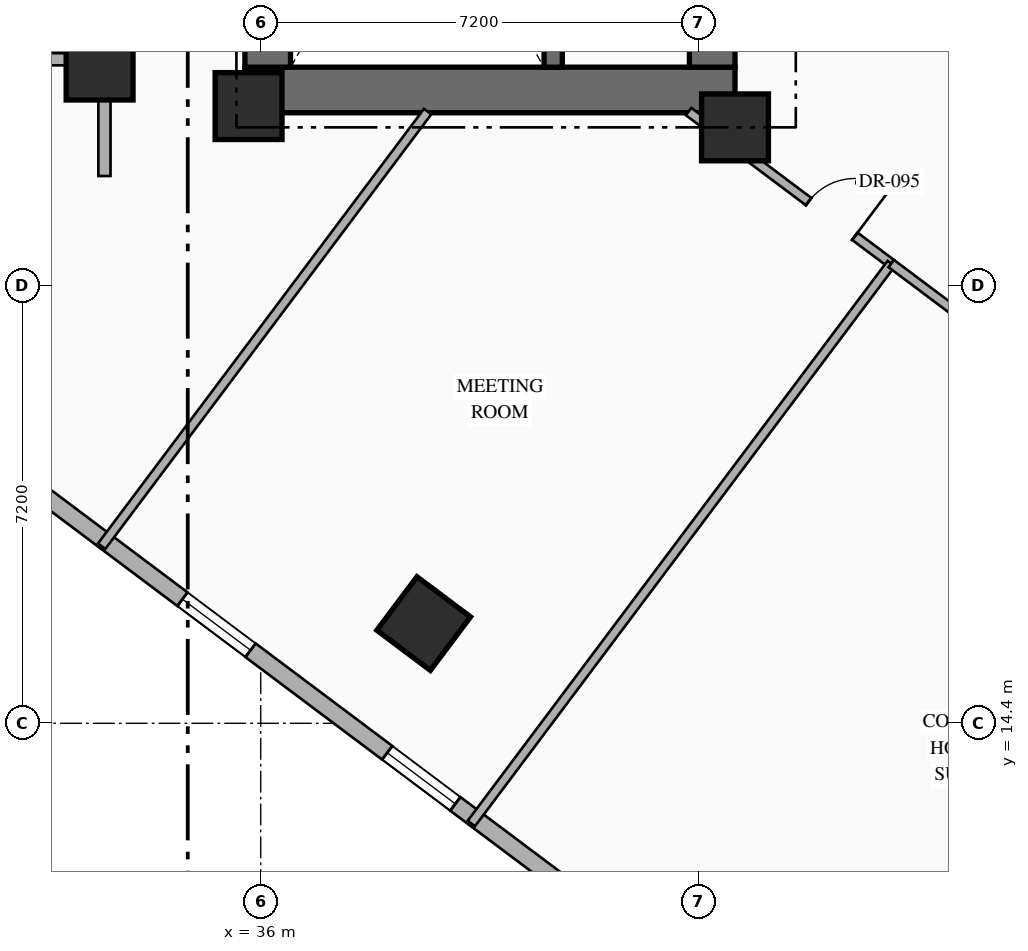
"""IFC4 building model, lengths in metres.
Left out: names, types, materials, properties, quantities, classifications, styles, units other than length and angle.
Written with IfcOpenShell. Run it as: python <this file> out.ifc"""

import sys

from ifc_helpers import new_model, si_unit, direction, frame, frame_2d, origin, origin_2d, place, context, subcontext, project, spatial, rectangle, hollow_rectangle, extrude, element, fill, save


model = new_model("IFC4")
c1 = context("Model", 3, precision=1e-05, world=origin(), true_north=direction((0.0, 1.0)))
c2 = subcontext(c1, "Body", "Model", "MODEL_VIEW")
j1 = project(units=[si_unit("LENGTHUNIT", "METRE"), si_unit("PLANEANGLEUNIT", "RADIAN")], contexts=[c1])
p1 = place(None, origin())
s1 = spatial("IfcSite", under=j1, at=p1, CompositionType="ELEMENT")
p2 = place(p1, origin())
s2 = spatial("IfcBuilding", under=s1, at=p2, CompositionType="ELEMENT")
p3 = place(p2, frame((0.0, 0.0, 46.65)))
s3 = spatial("IfcBuildingStorey", under=s2, at=p3, CompositionType="ELEMENT", Elevation=46.65)
p4 = place(p3, frame((35.74, 24.815, 0.0), z_axis=(0.0, 0.0, 1.0), x_axis=(1.0, 0.0, 0.0)))
e1 = element("IfcWall", 1, at=p4, inside=s3, PredefinedType="SHEAR", context=c2, shape_type="SweptSolid", body=[
    extrude(rectangle(XDim=8.06, YDim=0.75, at=frame_2d((4.03, 0.0))), origin(), (0.0, 0.0, 1.0), 3.35),
])
p5 = place(p3, frame((36.115, 25.19, 0.0), z_axis=(0.0, 0.0, 1.0), x_axis=(0.0, 1.0, 0.0)))
e2 = element("IfcWall", 2, at=p5, inside=s3, PredefinedType="SHEAR", context=c2, shape_type="SweptSolid", body=[
    extrude(rectangle(XDim=9.48, YDim=0.75, at=frame_2d((4.74, 0.0))), origin(), (0.0, 0.0, 1.0), 3.35),
])
p6 = place(p3, frame((43.425, 25.19, 0.0), z_axis=(0.0, 0.0, 1.0), x_axis=(0.0, 1.0, 0.0)))
e3 = element("IfcWall", 3, at=p6, inside=s3, PredefinedType="SHEAR", context=c2, shape_type="SweptSolid", body=[
    extrude(rectangle(XDim=9.48, YDim=0.75, at=frame_2d((4.74, 0.0))), origin(), (0.0, 0.0, 1.0), 3.35),
])
p7 = place(p6, frame((1.21, 0.0, 0.0)))
e4 = element("IfcOpeningElement", 4, at=p7, cuts=e3, PredefinedType="OPENING", context=c2, shape_type="SweptSolid", body=[
    extrude(rectangle(XDim=0.85, YDim=2.08, at=frame_2d((0.425, 1.04))), frame((0.0, 0.385, 0.0), z_axis=(0.0, -1.0, 0.0), x_axis=(1.0, 0.0, 0.0)), (0.0, 0.0, 1.0), 0.77),
])
p8 = place(p6, frame((4.46, 0.0, 0.0)))
e5 = element("IfcOpeningElement", 5, at=p8, cuts=e3, PredefinedType="OPENING", context=c2, shape_type="SweptSolid", body=[
    extrude(rectangle(XDim=0.85, YDim=2.08, at=frame_2d((0.425, 1.04))), frame((0.0, 0.385, 0.0), z_axis=(0.0, -1.0, 0.0), x_axis=(1.0, 0.0, 0.0)), (0.0, 0.0, 1.0), 0.77),
])
p9 = place(p3, frame((40.81, 25.19, 0.0), z_axis=(0.0, 0.0, 1.0), x_axis=(0.0, 1.0, 0.0)))
e6 = element("IfcWall", 6, at=p9, inside=s3, PredefinedType="SHEAR", context=c2, shape_type="SweptSolid", body=[
    extrude(rectangle(XDim=9.48, YDim=0.3, at=frame_2d((4.74, 0.0))), origin(), (0.0, 0.0, 1.0), 3.35),
])
for number, where, z_axis, x_axis in (
    (7, (35.8, 24.55, 0.0), (0.0, 0.0, 1.0), (1.0, 0.0, 0.0)),
    (8, (43.8, 24.2, 0.0), (0.0, 0.0, 1.0), (1.0, 0.0, 0.0)),
):
    element("IfcColumn", number, at=place(p3, frame(where, z_axis=z_axis, x_axis=x_axis)), inside=s3, PredefinedType="COLUMN", context=c2, shape_type="SweptSolid", body=[
        extrude(rectangle(XDim=1.1, YDim=1.1, at=origin_2d()), origin(), (0.0, 0.0, 1.0), 3.35),
    ])
for number, where, z_axis, x_axis in (
    (9, (33.35, 25.2, 0.0), (0.0, 0.0, 1.0), (1.0, 0.0, 0.0)),
    (10, (38.68, 16.04, 0.0), (0.0, 0.0, 1.0), (0.8, -0.6, 0.0)),
):
    element("IfcColumn", number, at=place(p3, frame(where, z_axis=z_axis, x_axis=x_axis)), inside=s3, PredefinedType="COLUMN", context=c2, shape_type="SweptSolid", body=[
        extrude(hollow_rectangle(XDim=1.1, YDim=1.1, WallThickness=0.04, at=origin_2d()), origin(), (0.0, 0.0, 1.0), 3.35),
    ])
p10 = place(p3, frame((44.86, 40.73, 0.0), z_axis=(0.0, 0.0, 1.0), x_axis=(0.800006902154, -0.599990797017, 0.0)))
e11 = element("IfcWall", 11, at=p10, inside=s3, PredefinedType="STANDARD", context=c2, shape_type="SweptSolid", body=[
    extrude(rectangle(XDim=29.712, YDim=0.28, at=frame_2d((14.856, 0.0))), origin(), (0.0, 0.0, 1.0), 3.13),
])
p11 = place(p10, frame((14.249, 0.0, 0.0)))
e12 = element("IfcOpeningElement", 12, at=p11, cuts=e11, PredefinedType="OPENING", context=c2, shape_type="SweptSolid", body=[
    extrude(rectangle(XDim=1.1, YDim=2.2, at=frame_2d((0.55, 1.1))), frame((0.0, 0.15, 0.0), z_axis=(0.0, -1.0, 0.0), x_axis=(1.0, 0.0, 0.0)), (0.0, 0.0, 1.0), 0.3),
])
p12 = place(p10, frame((1.612, 0.0, 0.85)))
e13 = element("IfcOpeningElement", 13, at=p12, cuts=e11, PredefinedType="OPENING", context=c2, shape_type="SweptSolid", body=[
    extrude(rectangle(XDim=1.4, YDim=1.8, at=frame_2d((0.7, 0.9))), frame((0.0, 0.15, 0.0), z_axis=(0.0, -1.0, 0.0), x_axis=(1.0, 0.0, 0.0)), (0.0, 0.0, 1.0), 0.3),
])
p13 = place(p10, frame((5.667, 0.0, 0.85)))
e14 = element("IfcOpeningElement", 14, at=p13, cuts=e11, PredefinedType="OPENING", context=c2, shape_type="SweptSolid", body=[
    extrude(rectangle(XDim=1.4, YDim=1.8, at=frame_2d((0.7, 0.9))), frame((0.0, 0.15, 0.0), z_axis=(0.0, -1.0, 0.0), x_axis=(1.0, 0.0, 0.0)), (0.0, 0.0, 1.0), 0.3),
])
p14 = place(p10, frame((9.912, 0.0, 0.85)))
e15 = element("IfcOpeningElement", 15, at=p14, cuts=e11, PredefinedType="OPENING", context=c2, shape_type="SweptSolid", body=[
    extrude(rectangle(XDim=1.4, YDim=1.8, at=frame_2d((0.7, 0.9))), frame((0.0, 0.15, 0.0), z_axis=(0.0, -1.0, 0.0), x_axis=(1.0, 0.0, 0.0)), (0.0, 0.0, 1.0), 0.3),
])
p15 = place(p10, frame((18.803, 0.0, 0.85)))
e16 = element("IfcOpeningElement", 16, at=p15, cuts=e11, PredefinedType="OPENING", context=c2, shape_type="SweptSolid", body=[
    extrude(rectangle(XDim=1.4, YDim=1.8, at=frame_2d((0.7, 0.9))), frame((0.0, 0.15, 0.0), z_axis=(0.0, -1.0, 0.0), x_axis=(1.0, 0.0, 0.0)), (0.0, 0.0, 1.0), 0.3),
])
p16 = place(p10, frame((22.645, 0.0, 0.85)))
e17 = element("IfcOpeningElement", 17, at=p16, cuts=e11, PredefinedType="OPENING", context=c2, shape_type="SweptSolid", body=[
    extrude(rectangle(XDim=1.4, YDim=1.8, at=frame_2d((0.7, 0.9))), frame((0.0, 0.15, 0.0), z_axis=(0.0, -1.0, 0.0), x_axis=(1.0, 0.0, 0.0)), (0.0, 0.0, 1.0), 0.3),
])
p17 = place(p10, frame((27.668, 0.0, 0.85)))
e18 = element("IfcOpeningElement", 18, at=p17, cuts=e11, PredefinedType="OPENING", context=c2, shape_type="SweptSolid", body=[
    extrude(rectangle(XDim=1.4, YDim=1.8, at=frame_2d((0.7, 0.9))), frame((0.0, 0.15, 0.0), z_axis=(0.0, -1.0, 0.0), x_axis=(1.0, 0.0, 0.0)), (0.0, 0.0, 1.0), 0.3),
])
p18 = place(p3, frame((53.318, 2.487, 0.0), z_axis=(0.0, 0.0, 1.0), x_axis=(-0.800004174678, 0.599994433723, 0.0)))
e19 = element("IfcWall", 19, at=p18, inside=s3, PredefinedType="STANDARD", context=c2, shape_type="SweptSolid", body=[
    extrude(rectangle(XDim=35.089, YDim=0.28, at=frame_2d((17.544, 0.0))), origin(), (0.0, 0.0, 1.0), 3.13),
])
p19 = place(p18, frame((1.931, 0.0, 0.85)))
e20 = element("IfcOpeningElement", 20, at=p19, cuts=e19, PredefinedType="OPENING", context=c2, shape_type="SweptSolid", body=[
    extrude(rectangle(XDim=1.4, YDim=1.8, at=frame_2d((0.7, 0.9))), frame((0.0, 0.15, 0.0), z_axis=(0.0, -1.0, 0.0), x_axis=(1.0, 0.0, 0.0)), (0.0, 0.0, 1.0), 0.3),
])
p20 = place(p18, frame((6.819, 0.0, 0.85)))
e21 = element("IfcOpeningElement", 21, at=p20, cuts=e19, PredefinedType="OPENING", context=c2, shape_type="SweptSolid", body=[
    extrude(rectangle(XDim=1.4, YDim=1.8, at=frame_2d((0.7, 0.9))), frame((0.0, 0.15, 0.0), z_axis=(0.0, -1.0, 0.0), x_axis=(1.0, 0.0, 0.0)), (0.0, 0.0, 1.0), 0.3),
])
p21 = place(p18, frame((11.832, 0.0, 0.85)))
e22 = element("IfcOpeningElement", 22, at=p21, cuts=e19, PredefinedType="OPENING", context=c2, shape_type="SweptSolid", body=[
    extrude(rectangle(XDim=1.4, YDim=1.8, at=frame_2d((0.7, 0.9))), frame((0.0, 0.15, 0.0), z_axis=(0.0, -1.0, 0.0), x_axis=(1.0, 0.0, 0.0)), (0.0, 0.0, 1.0), 0.3),
])
p22 = place(p18, frame((17.647, 0.0, 0.85)))
e23 = element("IfcOpeningElement", 23, at=p22, cuts=e19, PredefinedType="OPENING", context=c2, shape_type="SweptSolid", body=[
    extrude(rectangle(XDim=1.4, YDim=1.8, at=frame_2d((0.7, 0.9))), frame((0.0, 0.15, 0.0), z_axis=(0.0, -1.0, 0.0), x_axis=(1.0, 0.0, 0.0)), (0.0, 0.0, 1.0), 0.3),
])
p23 = place(p18, frame((21.857, 0.0, 0.85)))
e24 = element("IfcOpeningElement", 24, at=p23, cuts=e19, PredefinedType="OPENING", context=c2, shape_type="SweptSolid", body=[
    extrude(rectangle(XDim=1.4, YDim=1.8, at=frame_2d((0.7, 0.9))), frame((0.0, 0.15, 0.0), z_axis=(0.0, -1.0, 0.0), x_axis=(1.0, 0.0, 0.0)), (0.0, 0.0, 1.0), 0.3),
])
p24 = place(p18, frame((26.87, 0.0, 0.85)))
e25 = element("IfcOpeningElement", 25, at=p24, cuts=e19, PredefinedType="OPENING", context=c2, shape_type="SweptSolid", body=[
    extrude(rectangle(XDim=1.4, YDim=1.8, at=frame_2d((0.7, 0.9))), frame((0.0, 0.15, 0.0), z_axis=(0.0, -1.0, 0.0), x_axis=(1.0, 0.0, 0.0)), (0.0, 0.0, 1.0), 0.3),
])
p25 = place(p18, frame((31.757, 0.0, 0.85)))
e26 = element("IfcOpeningElement", 26, at=p25, cuts=e19, PredefinedType="OPENING", context=c2, shape_type="SweptSolid", body=[
    extrude(rectangle(XDim=1.4, YDim=1.8, at=frame_2d((0.7, 0.9))), frame((0.0, 0.15, 0.0), z_axis=(0.0, -1.0, 0.0), x_axis=(1.0, 0.0, 0.0)), (0.0, 0.0, 1.0), 0.3),
])
p26 = place(p3, frame((33.43, 23.4, 0.0), z_axis=(0.0, 0.0, 1.0), x_axis=(0.0, 1.0, 0.0)))
e27 = element("IfcWall", 27, at=p26, inside=s3, PredefinedType="STANDARD", context=c2, shape_type="SweptSolid", body=[
    extrude(rectangle(XDim=4.08, YDim=0.2, at=frame_2d((2.04, 0.0))), origin(), (0.0, 0.0, 1.0), 2.425),
])
p27 = place(p3, frame((25.55, 25.32, 0.0), z_axis=(0.0, 0.0, 1.0), x_axis=(1.0, 0.0, 0.0)))
e28 = element("IfcWall", 28, at=p27, inside=s3, PredefinedType="STANDARD", context=c2, shape_type="SweptSolid", body=[
    extrude(rectangle(XDim=7.88, YDim=0.2, at=frame_2d((3.94, 0.0))), origin(), (0.0, 0.0, 1.0), 2.525),
])
p28 = place(p3, frame((43.037, 24.46, 0.0), z_axis=(0.0, 0.0, 1.0), x_axis=(0.799971872363, -0.600037501685, 0.0)))
e29 = element("IfcWall", 29, at=p28, inside=s3, PredefinedType="PARTITIONING", context=c2, shape_type="SweptSolid", body=[
    extrude(rectangle(XDim=4.167, YDim=0.15, at=frame_2d((2.083, 0.0))), origin(), (0.0, 0.0, 1.0), 2.425),
])
p29 = place(p28, frame((2.468, 0.0, 0.0)))
e30 = element("IfcOpeningElement", 30, at=p29, cuts=e29, PredefinedType="OPENING", context=c2, shape_type="SweptSolid", body=[
    extrude(rectangle(XDim=0.95, YDim=2.15, at=frame_2d((0.475, 1.075))), frame((0.0, 0.085, 0.0), z_axis=(0.0, -1.0, 0.0), x_axis=(1.0, 0.0, 0.0)), (0.0, 0.0, 1.0), 0.17),
])
p30 = place(p3, frame((33.384, 17.312, 0.0), z_axis=(0.0, 0.0, 1.0), x_axis=(0.600008743659, 0.799993442181, 0.0)))
e31 = element("IfcWall", 31, at=p30, inside=s3, PredefinedType="PARTITIONING", context=c2, shape_type="SweptSolid", body=[
    extrude(rectangle(XDim=8.935, YDim=0.15, at=frame_2d((4.468, 0.0))), origin(), (0.0, 0.0, 1.0), 3.13),
])
p31 = place(p3, frame((39.464, 12.752, 0.0), z_axis=(0.0, 0.0, 1.0), x_axis=(0.6, 0.8, 0.0)))
e32 = element("IfcWall", 32, at=p31, inside=s3, PredefinedType="PARTITIONING", context=c2, shape_type="SweptSolid", body=[
    extrude(rectangle(XDim=11.51, YDim=0.15, at=frame_2d((5.755, 0.0))), origin(), (0.0, 0.0, 1.0), 3.13),
])
p32 = place(p3, frame((46.37, 21.96, 0.0), z_axis=(0.0, 0.0, 1.0), x_axis=(0.799997249048, -0.600003667918, 0.0)))
e33 = element("IfcWall", 33, at=p32, inside=s3, PredefinedType="PARTITIONING", context=c2, shape_type="SweptSolid", body=[
    extrude(rectangle(XDim=10.65, YDim=0.15, at=frame_2d((5.325, 0.0))), origin(), (0.0, 0.0, 1.0), 2.425),
])
p33 = place(p32, frame((3.062, 0.0, 0.0)))
e34 = element("IfcOpeningElement", 34, at=p33, cuts=e33, PredefinedType="OPENING", context=c2, shape_type="SweptSolid", body=[
    extrude(rectangle(XDim=0.95, YDim=2.15, at=frame_2d((0.475, 1.075))), frame((0.0, 0.085, 0.0), z_axis=(0.0, -1.0, 0.0), x_axis=(1.0, 0.0, 0.0)), (0.0, 0.0, 1.0), 0.17),
])
p34 = place(p22, origin())
e35 = element("IfcWindow", 35, at=p34, inside=s3, PartitioningType="SINGLE_PANEL", PredefinedType="WINDOW", context=c2, shape_type="SweptSolid", body=[
    extrude(rectangle(XDim=1.4, YDim=1.8, at=frame_2d((0.7, 0.9))), frame((0.0, 0.03, 0.0), z_axis=(0.0, -1.0, 0.0), x_axis=(1.0, 0.0, 0.0)), (0.0, 0.0, 1.0), 0.06),
])
fill(e23, e35)
p35 = place(p23, origin())
e36 = element("IfcWindow", 36, at=p35, inside=s3, PartitioningType="SINGLE_PANEL", PredefinedType="WINDOW", context=c2, shape_type="SweptSolid", body=[
    extrude(rectangle(XDim=1.4, YDim=1.8, at=frame_2d((0.7, 0.9))), frame((0.0, 0.03, 0.0), z_axis=(0.0, -1.0, 0.0), x_axis=(1.0, 0.0, 0.0)), (0.0, 0.0, 1.0), 0.06),
])
fill(e24, e36)
p36 = place(p29, origin())
e37 = element("IfcDoor", 37, at=p36, inside=s3, OperationType="SINGLE_SWING_RIGHT", PredefinedType="DOOR", context=c2, shape_type="SweptSolid", body=[
    extrude(rectangle(XDim=0.95, YDim=2.15, at=frame_2d((0.475, 1.075))), frame((0.0, 0.025, 0.0), z_axis=(0.0, -1.0, 0.0), x_axis=(1.0, 0.0, 0.0)), (0.0, 0.0, 1.0), 0.05),
])
fill(e30, e37)
save(model, sys.argv[1])
